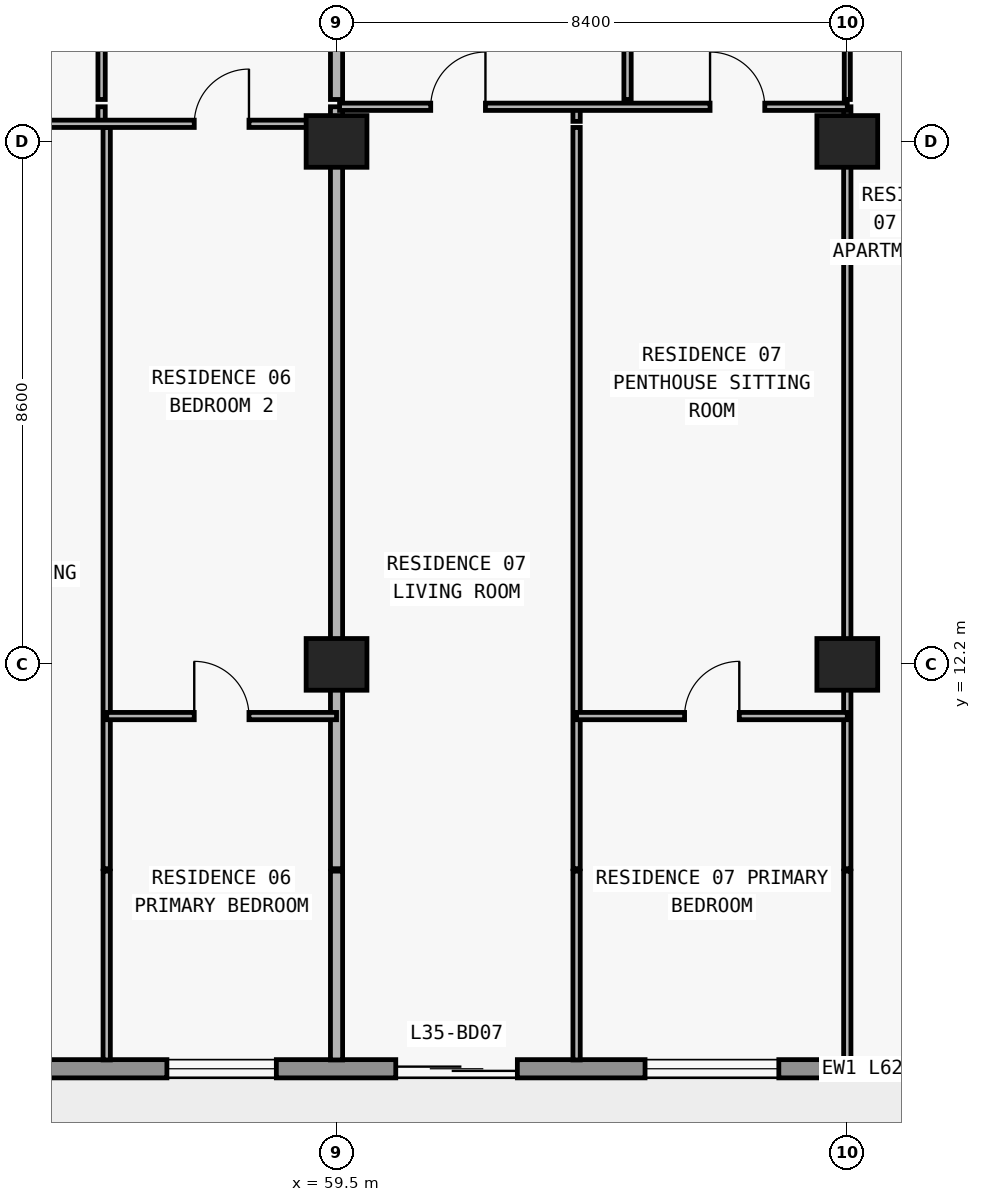
"""IFC4 building model, lengths in metres.
Left out: names, types, materials, properties, quantities, classifications, styles, units other than length and angle.
Written with IfcOpenShell. Run it as: python <this file> out.ifc"""

import sys

from ifc_helpers import new_model, si_unit, direction, frame, frame_2d, origin, origin_2d, place, context, subcontext, project, spatial, rectangle, extrude, element, fill, save


model = new_model("IFC4")
c1 = context("Model", 3, precision=1e-05, world=origin(), true_north=direction((0.0, 1.0)))
c2 = subcontext(c1, "Body", "Model", "MODEL_VIEW")
j1 = project(units=[si_unit("LENGTHUNIT", "METRE"), si_unit("PLANEANGLEUNIT", "RADIAN")], contexts=[c1])
p1 = place(None, origin())
s1 = spatial("IfcSite", under=j1, at=p1, CompositionType="ELEMENT")
p2 = place(p1, origin())
s2 = spatial("IfcBuilding", under=s1, at=p2, CompositionType="ELEMENT")
p3 = place(p2, frame((0.0, 0.0, 129.0)))
s3 = spatial("IfcBuildingStorey", under=s2, at=p3, CompositionType="ELEMENT", Elevation=129.0)
for number, where, z_axis, x_axis in (
    (1, (59.5, 12.2, 0.0), (0.0, 0.0, 1.0), (1.0, 0.0, 0.0)),
    (2, (67.9, 12.2, 0.0), (0.0, 0.0, 1.0), (1.0, 0.0, 0.0)),
    (3, (59.5, 20.8, 0.0), (0.0, 0.0, 1.0), (1.0, 0.0, 0.0)),
    (4, (67.9, 20.8, 0.0), (0.0, 0.0, 1.0), (1.0, 0.0, 0.0)),
):
    element("IfcColumn", number, at=place(p3, frame(where, z_axis=z_axis, x_axis=x_axis)), inside=s3, PredefinedType="COLUMN", context=c2, shape_type="SweptSolid", body=[
        extrude(rectangle(XDim=1.0, YDim=0.85, at=origin_2d()), origin(), (0.0, 0.0, 1.0), 3.05),
    ])
p4 = place(p3, frame((70.1, 5.55, 0.0), z_axis=(0.0, 0.0, 1.0), x_axis=(-1.0, 0.0, 0.0)))
e5 = element("IfcWall", 5, at=p4, inside=s3, PredefinedType="STANDARD", context=c2, shape_type="SweptSolid", body=[
    extrude(rectangle(XDim=62.4, YDim=0.3, at=frame_2d((31.2, 0.0))), origin(), (0.0, 0.0, 1.0), 3.05),
])
p5 = place(p4, frame((57.226, 0.0, 0.0)))
e6 = element("IfcOpeningElement", 6, at=p5, cuts=e5, PredefinedType="OPENING", context=c2, shape_type="SweptSolid", body=[
    extrude(rectangle(XDim=2.0, YDim=2.3, at=frame_2d((1.0, 1.15))), frame((0.0, 0.16, 0.0), z_axis=(0.0, -1.0, 0.0), x_axis=(1.0, 0.0, 0.0)), (0.0, 0.0, 1.0), 0.32),
])
p6 = place(p4, frame((52.926, 0.0, 0.85)))
e7 = element("IfcOpeningElement", 7, at=p6, cuts=e5, PredefinedType="OPENING", context=c2, shape_type="SweptSolid", body=[
    extrude(rectangle(XDim=2.2, YDim=1.55, at=frame_2d((1.1, 0.775))), frame((0.0, 0.16, 0.0), z_axis=(0.0, -1.0, 0.0), x_axis=(1.0, 0.0, 0.0)), (0.0, 0.0, 1.0), 0.32),
])
p7 = place(p4, frame((48.49, 0.0, 0.0)))
e8 = element("IfcOpeningElement", 8, at=p7, cuts=e5, PredefinedType="OPENING", context=c2, shape_type="SweptSolid", body=[
    extrude(rectangle(XDim=2.0, YDim=2.3, at=frame_2d((1.0, 1.15))), frame((0.0, 0.16, 0.0), z_axis=(0.0, -1.0, 0.0), x_axis=(1.0, 0.0, 0.0)), (0.0, 0.0, 1.0), 0.32),
])
p8 = place(p4, frame((44.39, 0.0, 0.85)))
e9 = element("IfcOpeningElement", 9, at=p8, cuts=e5, PredefinedType="OPENING", context=c2, shape_type="SweptSolid", body=[
    extrude(rectangle(XDim=1.8, YDim=1.55, at=frame_2d((0.9, 0.775))), frame((0.0, 0.16, 0.0), z_axis=(0.0, -1.0, 0.0), x_axis=(1.0, 0.0, 0.0)), (0.0, 0.0, 1.0), 0.32),
])
p9 = place(p4, frame((40.426, 0.0, 0.0)))
e10 = element("IfcOpeningElement", 10, at=p9, cuts=e5, PredefinedType="OPENING", context=c2, shape_type="SweptSolid", body=[
    extrude(rectangle(XDim=2.0, YDim=2.3, at=frame_2d((1.0, 1.15))), frame((0.0, 0.16, 0.0), z_axis=(0.0, -1.0, 0.0), x_axis=(1.0, 0.0, 0.0)), (0.0, 0.0, 1.0), 0.32),
])
p10 = place(p4, frame((36.126, 0.0, 0.85)))
e11 = element("IfcOpeningElement", 11, at=p10, cuts=e5, PredefinedType="OPENING", context=c2, shape_type="SweptSolid", body=[
    extrude(rectangle(XDim=2.2, YDim=1.55, at=frame_2d((1.1, 0.775))), frame((0.0, 0.16, 0.0), z_axis=(0.0, -1.0, 0.0), x_axis=(1.0, 0.0, 0.0)), (0.0, 0.0, 1.0), 0.32),
])
p11 = place(p4, frame((31.91, 0.0, 0.0)))
e12 = element("IfcOpeningElement", 12, at=p11, cuts=e5, PredefinedType="OPENING", context=c2, shape_type="SweptSolid", body=[
    extrude(rectangle(XDim=2.0, YDim=2.3, at=frame_2d((1.0, 1.15))), frame((0.0, 0.16, 0.0), z_axis=(0.0, -1.0, 0.0), x_axis=(1.0, 0.0, 0.0)), (0.0, 0.0, 1.0), 0.32),
])
p12 = place(p4, frame((28.21, 0.0, 0.85)))
e13 = element("IfcOpeningElement", 13, at=p12, cuts=e5, PredefinedType="OPENING", context=c2, shape_type="SweptSolid", body=[
    extrude(rectangle(XDim=1.8, YDim=1.55, at=frame_2d((0.9, 0.775))), frame((0.0, 0.16, 0.0), z_axis=(0.0, -1.0, 0.0), x_axis=(1.0, 0.0, 0.0)), (0.0, 0.0, 1.0), 0.32),
])
p13 = place(p4, frame((24.426, 0.0, 0.0)))
e14 = element("IfcOpeningElement", 14, at=p13, cuts=e5, PredefinedType="OPENING", context=c2, shape_type="SweptSolid", body=[
    extrude(rectangle(XDim=2.0, YDim=2.3, at=frame_2d((1.0, 1.15))), frame((0.0, 0.16, 0.0), z_axis=(0.0, -1.0, 0.0), x_axis=(1.0, 0.0, 0.0)), (0.0, 0.0, 1.0), 0.32),
])
p14 = place(p4, frame((20.126, 0.0, 0.85)))
e15 = element("IfcOpeningElement", 15, at=p14, cuts=e5, PredefinedType="OPENING", context=c2, shape_type="SweptSolid", body=[
    extrude(rectangle(XDim=2.2, YDim=1.55, at=frame_2d((1.1, 0.775))), frame((0.0, 0.16, 0.0), z_axis=(0.0, -1.0, 0.0), x_axis=(1.0, 0.0, 0.0)), (0.0, 0.0, 1.0), 0.32),
])
p15 = place(p4, frame((15.69, 0.0, 0.0)))
e16 = element("IfcOpeningElement", 16, at=p15, cuts=e5, PredefinedType="OPENING", context=c2, shape_type="SweptSolid", body=[
    extrude(rectangle(XDim=2.0, YDim=2.3, at=frame_2d((1.0, 1.15))), frame((0.0, 0.16, 0.0), z_axis=(0.0, -1.0, 0.0), x_axis=(1.0, 0.0, 0.0)), (0.0, 0.0, 1.0), 0.32),
])
p16 = place(p4, frame((11.59, 0.0, 0.85)))
e17 = element("IfcOpeningElement", 17, at=p16, cuts=e5, PredefinedType="OPENING", context=c2, shape_type="SweptSolid", body=[
    extrude(rectangle(XDim=1.8, YDim=1.55, at=frame_2d((0.9, 0.775))), frame((0.0, 0.16, 0.0), z_axis=(0.0, -1.0, 0.0), x_axis=(1.0, 0.0, 0.0)), (0.0, 0.0, 1.0), 0.32),
])
p17 = place(p4, frame((7.626, 0.0, 0.0)))
e18 = element("IfcOpeningElement", 18, at=p17, cuts=e5, PredefinedType="OPENING", context=c2, shape_type="SweptSolid", body=[
    extrude(rectangle(XDim=2.0, YDim=2.3, at=frame_2d((1.0, 1.15))), frame((0.0, 0.16, 0.0), z_axis=(0.0, -1.0, 0.0), x_axis=(1.0, 0.0, 0.0)), (0.0, 0.0, 1.0), 0.32),
])
p18 = place(p4, frame((3.326, 0.0, 0.85)))
e19 = element("IfcOpeningElement", 19, at=p18, cuts=e5, PredefinedType="OPENING", context=c2, shape_type="SweptSolid", body=[
    extrude(rectangle(XDim=2.2, YDim=1.55, at=frame_2d((1.1, 0.775))), frame((0.0, 0.16, 0.0), z_axis=(0.0, -1.0, 0.0), x_axis=(1.0, 0.0, 0.0)), (0.0, 0.0, 1.0), 0.32),
])
p19 = place(p3, frame((55.636, 21.13, 0.0), z_axis=(0.0, 0.0, 1.0), x_axis=(0.0, 1.0, 0.0)))
e20 = element("IfcWall", 20, at=p19, inside=s3, PredefinedType="PARTITIONING", context=c2, shape_type="SweptSolid", body=[
    extrude(rectangle(XDim=0.24, YDim=0.12, at=frame_2d((0.12, 0.0))), origin(), (0.0, 0.0, 1.0), 3.05),
])
p20 = place(p3, frame((55.636, 21.49, 0.0), z_axis=(0.0, 0.0, 1.0), x_axis=(0.0, 1.0, 0.0)))
e21 = element("IfcWall", 21, at=p20, inside=s3, PredefinedType="PARTITIONING", context=c2, shape_type="SweptSolid", body=[
    extrude(rectangle(XDim=4.69, YDim=0.12, at=frame_2d((2.345, 0.0))), origin(), (0.0, 0.0, 1.0), 3.05),
])
p21 = place(p20, frame((1.895, 0.0, 0.0)))
e22 = element("IfcOpeningElement", 22, at=p21, cuts=e21, PredefinedType="OPENING", context=c2, shape_type="SweptSolid", body=[
    extrude(rectangle(XDim=0.9, YDim=2.15, at=frame_2d((0.45, 1.075))), frame((0.0, 0.07, 0.0), z_axis=(0.0, -1.0, 0.0), x_axis=(1.0, 0.0, 0.0)), (0.0, 0.0, 1.0), 0.14),
])
p22 = place(p3, frame((55.72, 5.695, 0.0), z_axis=(0.0, 0.0, 1.0), x_axis=(0.0, 1.0, 0.0)))
e23 = element("IfcWall", 23, at=p22, inside=s3, PredefinedType="PARTITIONING", context=c2, shape_type="SweptSolid", body=[
    extrude(rectangle(XDim=3.105, YDim=0.12, at=frame_2d((1.552, 0.0))), origin(), (0.0, 0.0, 1.0), 3.05),
])
p23 = place(p3, frame((55.72, 8.84, 0.0), z_axis=(0.0, 0.0, 1.0), x_axis=(0.0, 1.0, 0.0)))
e24 = element("IfcWall", 24, at=p23, inside=s3, PredefinedType="PARTITIONING", context=c2, shape_type="SweptSolid", body=[
    extrude(rectangle(XDim=12.19, YDim=0.12, at=frame_2d((6.095, 0.0))), origin(), (0.0, 0.0, 1.0), 3.05),
])
p24 = place(p3, frame((59.5, 5.695, 0.0), z_axis=(0.0, 0.0, 1.0), x_axis=(0.0, 1.0, 0.0)))
e25 = element("IfcWall", 25, at=p24, inside=s3, PredefinedType="PARTITIONING", context=c2, shape_type="SweptSolid", body=[
    extrude(rectangle(XDim=3.105, YDim=0.2, at=frame_2d((1.552, 0.0))), origin(), (0.0, 0.0, 1.0), 3.05),
])
p25 = place(p3, frame((59.5, 8.84, 0.0), z_axis=(0.0, 0.0, 1.0), x_axis=(0.0, 1.0, 0.0)))
e26 = element("IfcWall", 26, at=p25, inside=s3, PredefinedType="PARTITIONING", context=c2, shape_type="SweptSolid", body=[
    extrude(rectangle(XDim=12.19, YDim=0.2, at=frame_2d((6.095, 0.0))), origin(), (0.0, 0.0, 1.0), 2.174),
])
p26 = place(p3, frame((59.5, 21.13, 0.0), z_axis=(0.0, 0.0, 1.0), x_axis=(0.0, 1.0, 0.0)))
e27 = element("IfcWall", 27, at=p26, inside=s3, PredefinedType="PARTITIONING", context=c2, shape_type="SweptSolid", body=[
    extrude(rectangle(XDim=0.24, YDim=0.2, at=frame_2d((0.12, 0.0))), origin(), (0.0, 0.0, 1.0), 2.174),
])
p27 = place(p3, frame((59.5, 21.49, 0.0), z_axis=(0.0, 0.0, 1.0), x_axis=(0.0, 1.0, 0.0)))
e28 = element("IfcWall", 28, at=p27, inside=s3, PredefinedType="PARTITIONING", context=c2, shape_type="SweptSolid", body=[
    extrude(rectangle(XDim=4.69, YDim=0.2, at=frame_2d((2.345, 0.0))), origin(), (0.0, 0.0, 1.0), 2.174),
])
p28 = place(p3, frame((63.448, 5.695, 0.0), z_axis=(0.0, 0.0, 1.0), x_axis=(0.0, 1.0, 0.0)))
e29 = element("IfcWall", 29, at=p28, inside=s3, PredefinedType="PARTITIONING", context=c2, shape_type="SweptSolid", body=[
    extrude(rectangle(XDim=3.105, YDim=0.12, at=frame_2d((1.552, 0.0))), origin(), (0.0, 0.0, 1.0), 3.05),
])
p29 = place(p3, frame((63.448, 8.84, 0.0), z_axis=(0.0, 0.0, 1.0), x_axis=(0.0, 1.0, 0.0)))
e30 = element("IfcWall", 30, at=p29, inside=s3, PredefinedType="PARTITIONING", context=c2, shape_type="SweptSolid", body=[
    extrude(rectangle(XDim=12.19, YDim=0.12, at=frame_2d((6.095, 0.0))), origin(), (0.0, 0.0, 1.0), 3.05),
])
p30 = place(p3, frame((63.448, 21.13, 0.0), z_axis=(0.0, 0.0, 1.0), x_axis=(0.0, 1.0, 0.0)))
e31 = element("IfcWall", 31, at=p30, inside=s3, PredefinedType="PARTITIONING", context=c2, shape_type="SweptSolid", body=[
    extrude(rectangle(XDim=0.24, YDim=0.12, at=frame_2d((0.12, 0.0))), origin(), (0.0, 0.0, 1.0), 3.05),
])
p31 = place(p3, frame((64.286, 21.49, 0.0), z_axis=(0.0, 0.0, 1.0), x_axis=(0.0, 1.0, 0.0)))
e32 = element("IfcWall", 32, at=p31, inside=s3, PredefinedType="PARTITIONING", context=c2, shape_type="SweptSolid", body=[
    extrude(rectangle(XDim=4.69, YDim=0.12, at=frame_2d((2.345, 0.0))), origin(), (0.0, 0.0, 1.0), 3.05),
])
p32 = place(p31, frame((1.895, 0.0, 0.0)))
e33 = element("IfcOpeningElement", 33, at=p32, cuts=e32, PredefinedType="OPENING", context=c2, shape_type="SweptSolid", body=[
    extrude(rectangle(XDim=0.9, YDim=2.15, at=frame_2d((0.45, 1.075))), frame((0.0, 0.07, 0.0), z_axis=(0.0, -1.0, 0.0), x_axis=(1.0, 0.0, 0.0)), (0.0, 0.0, 1.0), 0.14),
])
p33 = place(p3, frame((67.9, 5.695, 0.0), z_axis=(0.0, 0.0, 1.0), x_axis=(0.0, 1.0, 0.0)))
e34 = element("IfcWall", 34, at=p33, inside=s3, PredefinedType="PARTITIONING", context=c2, shape_type="SweptSolid", body=[
    extrude(rectangle(XDim=3.105, YDim=0.12, at=frame_2d((1.552, 0.0))), origin(), (0.0, 0.0, 1.0), 3.05),
])
p34 = place(p3, frame((67.9, 8.84, 0.0), z_axis=(0.0, 0.0, 1.0), x_axis=(0.0, 1.0, 0.0)))
e35 = element("IfcWall", 35, at=p34, inside=s3, PredefinedType="PARTITIONING", context=c2, shape_type="SweptSolid", body=[
    extrude(rectangle(XDim=12.19, YDim=0.12, at=frame_2d((6.095, 0.0))), origin(), (0.0, 0.0, 1.0), 2.174),
])
p35 = place(p3, frame((67.9, 21.13, 0.0), z_axis=(0.0, 0.0, 1.0), x_axis=(0.0, 1.0, 0.0)))
e36 = element("IfcWall", 36, at=p35, inside=s3, PredefinedType="PARTITIONING", context=c2, shape_type="SweptSolid", body=[
    extrude(rectangle(XDim=0.24, YDim=0.12, at=frame_2d((0.12, 0.0))), origin(), (0.0, 0.0, 1.0), 2.174),
])
p36 = place(p3, frame((67.9, 21.49, 0.0), z_axis=(0.0, 0.0, 1.0), x_axis=(0.0, 1.0, 0.0)))
e37 = element("IfcWall", 37, at=p36, inside=s3, PredefinedType="MOVABLE", context=c2, shape_type="SweptSolid", body=[
    extrude(rectangle(XDim=4.69, YDim=0.1, at=frame_2d((2.345, 0.0))), origin(), (0.0, 0.0, 1.0), 2.174),
])
p37 = place(p36, frame((1.895, 0.0, 0.0)))
e38 = element("IfcOpeningElement", 38, at=p37, cuts=e37, PredefinedType="OPENING", context=c2, shape_type="SweptSolid", body=[
    extrude(rectangle(XDim=0.9, YDim=2.124, at=frame_2d((0.45, 1.062))), frame((0.0, 0.06, 0.0), z_axis=(0.0, -1.0, 0.0), x_axis=(1.0, 0.0, 0.0)), (0.0, 0.0, 1.0), 0.12),
])
p38 = place(p3, frame((55.72, 11.35, 0.0), z_axis=(0.0, 0.0, 1.0), x_axis=(1.0, 0.0, 0.0)))
e39 = element("IfcWall", 39, at=p38, inside=s3, PredefinedType="PARTITIONING", context=c2, shape_type="SweptSolid", body=[
    extrude(rectangle(XDim=3.78, YDim=0.12, at=frame_2d((1.89, 0.0))), origin(), (0.0, 0.0, 1.0), 3.05),
])
p39 = place(p38, frame((1.44, 0.0, 0.0)))
e40 = element("IfcOpeningElement", 40, at=p39, cuts=e39, PredefinedType="OPENING", context=c2, shape_type="SweptSolid", body=[
    extrude(rectangle(XDim=0.9, YDim=2.15, at=frame_2d((0.45, 1.075))), frame((0.0, 0.07, 0.0), z_axis=(0.0, -1.0, 0.0), x_axis=(1.0, 0.0, 0.0)), (0.0, 0.0, 1.0), 0.14),
])
p40 = place(p3, frame((63.448, 11.35, 0.0), z_axis=(0.0, 0.0, 1.0), x_axis=(1.0, 0.0, 0.0)))
e41 = element("IfcWall", 41, at=p40, inside=s3, PredefinedType="PARTITIONING", context=c2, shape_type="SweptSolid", body=[
    extrude(rectangle(XDim=4.452, YDim=0.12, at=frame_2d((2.226, 0.0))), origin(), (0.0, 0.0, 1.0), 3.05),
])
p41 = place(p40, frame((1.776, 0.0, 0.0)))
e42 = element("IfcOpeningElement", 42, at=p41, cuts=e41, PredefinedType="OPENING", context=c2, shape_type="SweptSolid", body=[
    extrude(rectangle(XDim=0.9, YDim=2.15, at=frame_2d((0.45, 1.075))), frame((0.0, 0.07, 0.0), z_axis=(0.0, -1.0, 0.0), x_axis=(1.0, 0.0, 0.0)), (0.0, 0.0, 1.0), 0.14),
])
p42 = place(p3, frame((51.32, 21.09, 0.0), z_axis=(0.0, 0.0, 1.0), x_axis=(1.0, 0.0, 0.0)))
e43 = element("IfcWall", 43, at=p42, inside=s3, PredefinedType="PARTITIONING", context=c2, shape_type="SweptSolid", body=[
    extrude(rectangle(XDim=8.18, YDim=0.12, at=frame_2d((4.09, 0.0))), origin(), (0.0, 0.0, 1.0), 2.174),
])
p43 = place(p42, frame((1.708, 0.0, 0.0)))
e44 = element("IfcOpeningElement", 44, at=p43, cuts=e43, PredefinedType="OPENING", context=c2, shape_type="SweptSolid", body=[
    extrude(rectangle(XDim=0.9, YDim=2.124, at=frame_2d((0.45, 1.062))), frame((0.0, 0.07, 0.0), z_axis=(0.0, -1.0, 0.0), x_axis=(1.0, 0.0, 0.0)), (0.0, 0.0, 1.0), 0.14),
])
p44 = place(p42, frame((5.84, 0.0, 0.0)))
e45 = element("IfcOpeningElement", 45, at=p44, cuts=e43, PredefinedType="OPENING", context=c2, shape_type="SweptSolid", body=[
    extrude(rectangle(XDim=0.9, YDim=2.124, at=frame_2d((0.45, 1.062))), frame((0.0, 0.07, 0.0), z_axis=(0.0, -1.0, 0.0), x_axis=(1.0, 0.0, 0.0)), (0.0, 0.0, 1.0), 0.14),
])
p45 = place(p3, frame((59.55, 21.37, 0.0), z_axis=(0.0, 0.0, 1.0), x_axis=(1.0, 0.0, 0.0)))
e46 = element("IfcWall", 46, at=p45, inside=s3, PredefinedType="PARTITIONING", context=c2, shape_type="SweptSolid", body=[
    extrude(rectangle(XDim=8.35, YDim=0.12, at=frame_2d((4.175, 0.0))), origin(), (0.0, 0.0, 1.0), 3.05),
])
p46 = place(p45, frame((1.499, 0.0, 0.0)))
e47 = element("IfcOpeningElement", 47, at=p46, cuts=e46, PredefinedType="OPENING", context=c2, shape_type="SweptSolid", body=[
    extrude(rectangle(XDim=0.9, YDim=2.15, at=frame_2d((0.45, 1.075))), frame((0.0, 0.07, 0.0), z_axis=(0.0, -1.0, 0.0), x_axis=(1.0, 0.0, 0.0)), (0.0, 0.0, 1.0), 0.14),
])
p47 = place(p45, frame((6.093, 0.0, 0.0)))
e48 = element("IfcOpeningElement", 48, at=p47, cuts=e46, PredefinedType="OPENING", context=c2, shape_type="SweptSolid", body=[
    extrude(rectangle(XDim=0.9, YDim=2.15, at=frame_2d((0.45, 1.075))), frame((0.0, 0.07, 0.0), z_axis=(0.0, -1.0, 0.0), x_axis=(1.0, 0.0, 0.0)), (0.0, 0.0, 1.0), 0.14),
])
p48 = place(p16, origin())
e49 = element("IfcWindow", 49, at=p48, inside=s3, PartitioningType="SINGLE_PANEL", PredefinedType="WINDOW", context=c2, shape_type="SweptSolid", body=[
    extrude(rectangle(XDim=1.8, YDim=1.55, at=frame_2d((0.9, 0.775))), frame((0.0, 0.03, 0.0), z_axis=(0.0, -1.0, 0.0), x_axis=(1.0, 0.0, 0.0)), (0.0, 0.0, 1.0), 0.06),
])
fill(e17, e49)
p49 = place(p17, origin())
e50 = element("IfcDoor", 50, at=p49, inside=s3, OperationType="DOUBLE_DOOR_SLIDING", PredefinedType="DOOR", context=c2, shape_type="SweptSolid", body=[
    extrude(rectangle(XDim=2.0, YDim=2.3, at=frame_2d((1.0, 1.15))), frame((0.0, 0.025, 0.0), z_axis=(0.0, -1.0, 0.0), x_axis=(1.0, 0.0, 0.0)), (0.0, 0.0, 1.0), 0.05),
])
fill(e18, e50)
p50 = place(p18, origin())
e51 = element("IfcWindow", 51, at=p50, inside=s3, PartitioningType="SINGLE_PANEL", PredefinedType="WINDOW", context=c2, shape_type="SweptSolid", body=[
    extrude(rectangle(XDim=2.2, YDim=1.55, at=frame_2d((1.1, 0.775))), frame((0.0, 0.03, 0.0), z_axis=(0.0, -1.0, 0.0), x_axis=(1.0, 0.0, 0.0)), (0.0, 0.0, 1.0), 0.06),
])
fill(e19, e51)
p51 = place(p44, origin())
e52 = element("IfcDoor", 52, at=p51, inside=s3, OperationType="SINGLE_SWING_RIGHT", PredefinedType="DOOR", context=c2, shape_type="SweptSolid", body=[
    extrude(rectangle(XDim=0.9, YDim=2.124, at=frame_2d((0.45, 1.062))), frame((0.0, 0.025, 0.0), z_axis=(0.0, -1.0, 0.0), x_axis=(1.0, 0.0, 0.0)), (0.0, 0.0, 1.0), 0.05),
])
fill(e45, e52)
p52 = place(p39, origin())
e53 = element("IfcDoor", 53, at=p52, inside=s3, OperationType="SINGLE_SWING_LEFT", PredefinedType="DOOR", context=c2, shape_type="SweptSolid", body=[
    extrude(rectangle(XDim=0.9, YDim=2.15, at=frame_2d((0.45, 1.075))), frame((0.0, 0.025, 0.0), z_axis=(0.0, -1.0, 0.0), x_axis=(1.0, 0.0, 0.0)), (0.0, 0.0, 1.0), 0.05),
])
fill(e40, e53)
p53 = place(p46, origin())
e54 = element("IfcDoor", 54, at=p53, inside=s3, OperationType="SINGLE_SWING_RIGHT", PredefinedType="DOOR", context=c2, shape_type="SweptSolid", body=[
    extrude(rectangle(XDim=0.9, YDim=2.15, at=frame_2d((0.45, 1.075))), frame((0.0, 0.025, 0.0), z_axis=(0.0, -1.0, 0.0), x_axis=(1.0, 0.0, 0.0)), (0.0, 0.0, 1.0), 0.05),
])
fill(e47, e54)
p54 = place(p47, origin())
e55 = element("IfcDoor", 55, at=p54, inside=s3, OperationType="SINGLE_SWING_LEFT", PredefinedType="DOOR", context=c2, shape_type="SweptSolid", body=[
    extrude(rectangle(XDim=0.9, YDim=2.15, at=frame_2d((0.45, 1.075))), frame((0.0, 0.025, 0.0), z_axis=(0.0, -1.0, 0.0), x_axis=(1.0, 0.0, 0.0)), (0.0, 0.0, 1.0), 0.05),
])
fill(e48, e55)
p55 = place(p41, origin())
e56 = element("IfcDoor", 56, at=p55, inside=s3, OperationType="SINGLE_SWING_RIGHT", PredefinedType="DOOR", context=c2, shape_type="SweptSolid", body=[
    extrude(rectangle(XDim=0.9, YDim=2.15, at=frame_2d((0.45, 1.075))), frame((0.0, 0.025, 0.0), z_axis=(0.0, -1.0, 0.0), x_axis=(1.0, 0.0, 0.0)), (0.0, 0.0, 1.0), 0.05),
])
fill(e42, e56)
save(model, sys.argv[1])
